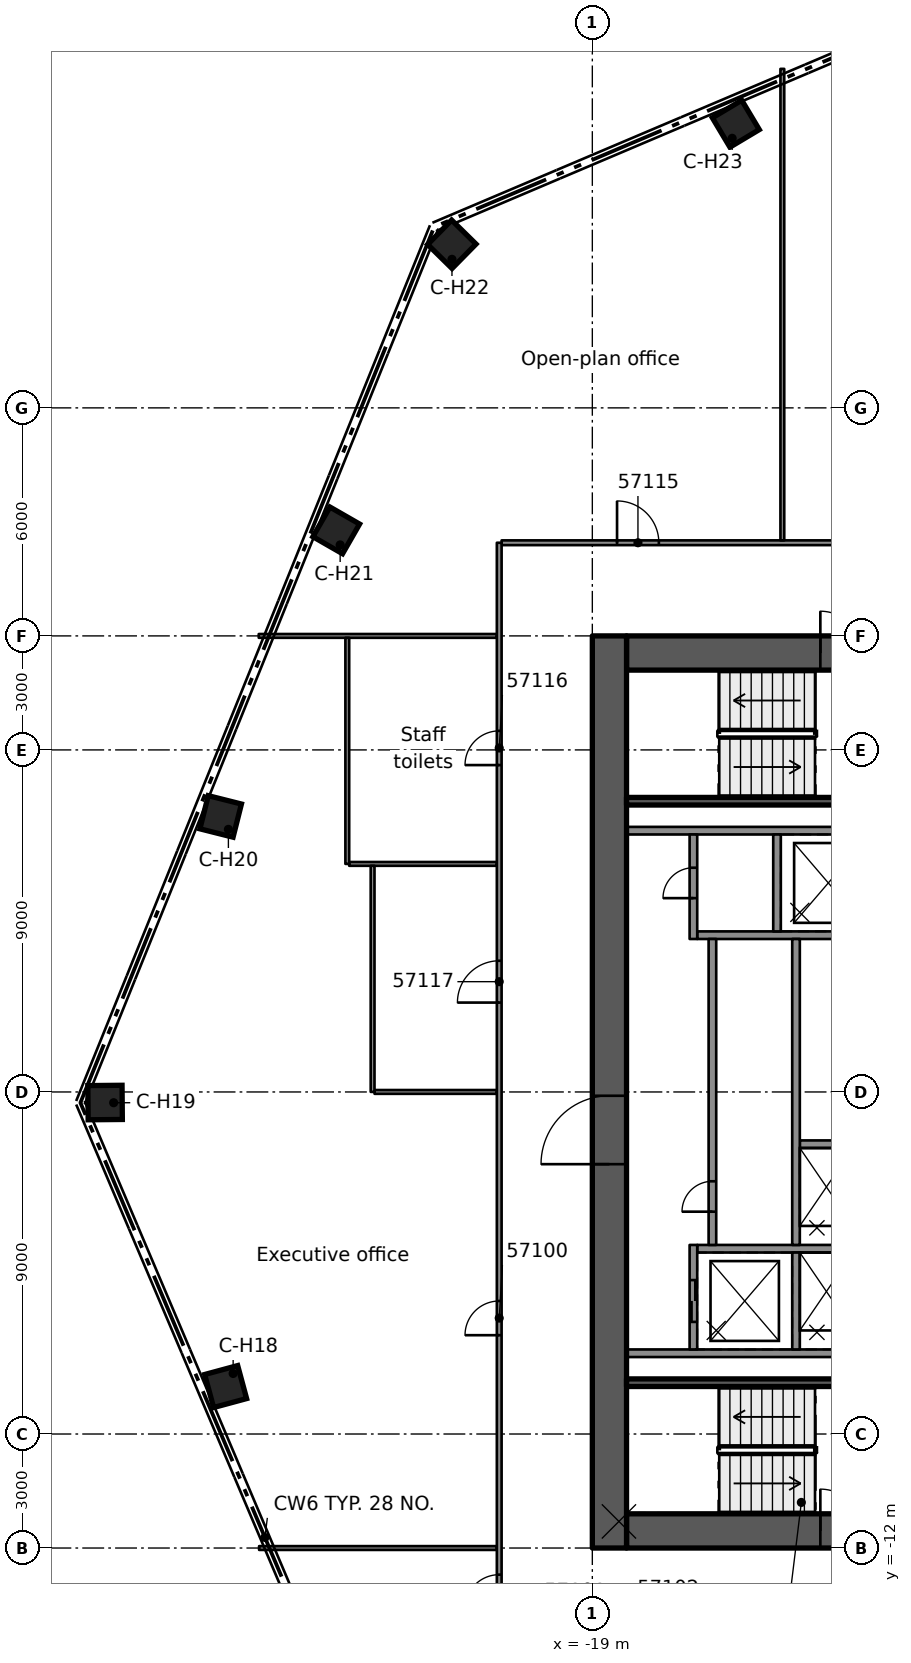
"""IFC4 building model, lengths in metres.
Left out: names, types, materials, properties, quantities, classifications, styles, units other than length and angle.
Written with IfcOpenShell. Run it as: python <this file> out.ifc"""

import sys

from ifc_helpers import new_model, si_unit, direction, frame, frame_2d, origin, origin_2d, place, context, subcontext, project, spatial, rectangle, extrude, element, fill, save


model = new_model("IFC4")
c1 = context("Model", 3, precision=1e-05, world=origin(), true_north=direction((0.0, 1.0)))
c2 = subcontext(c1, "Body", "Model", "MODEL_VIEW")
j1 = project(units=[si_unit("LENGTHUNIT", "METRE"), si_unit("PLANEANGLEUNIT", "RADIAN")], contexts=[c1])
p1 = place(None, origin())
s1 = spatial("IfcSite", under=j1, at=p1, CompositionType="ELEMENT")
p2 = place(p1, origin())
s2 = spatial("IfcBuilding", under=s1, at=p2, CompositionType="ELEMENT")
p3 = place(p2, frame((0.0, 0.0, 282.4)))
s3 = spatial("IfcBuildingStorey", under=s2, at=p3, CompositionType="ELEMENT", Elevation=282.4)
p4 = place(p3, frame((-18.1, 11.55, 0.0), z_axis=(0.0, 0.0, 1.0), x_axis=(1.0, 0.0, 0.0)))
e1 = element("IfcWall", 1, at=p4, inside=s3, PredefinedType="SHEAR", context=c2, shape_type="SweptSolid", body=[
    extrude(rectangle(XDim=9.2, YDim=0.9, at=frame_2d((4.6, 0.0))), origin(), (0.0, 0.0, 1.0), 3.5),
])
p5 = place(p4, frame((5.1, 0.0, 0.0)))
e2 = element("IfcOpeningElement", 2, at=p5, cuts=e1, PredefinedType="OPENING", context=c2, shape_type="SweptSolid", body=[
    extrude(rectangle(XDim=1.1, YDim=2.1, at=frame_2d((0.55, 1.05))), frame((0.0, 0.46, 0.0), z_axis=(0.0, -1.0, 0.0), x_axis=(1.0, 0.0, 0.0)), (0.0, 0.0, 1.0), 0.92),
])
p6 = place(p3, frame((-18.1, -11.55, 0.0), z_axis=(0.0, 0.0, 1.0), x_axis=(1.0, 0.0, 0.0)))
e3 = element("IfcWall", 3, at=p6, inside=s3, PredefinedType="SHEAR", context=c2, shape_type="SweptSolid", body=[
    extrude(rectangle(XDim=9.2, YDim=0.9, at=frame_2d((4.6, 0.0))), origin(), (0.0, 0.0, 1.0), 3.5),
])
p7 = place(p6, frame((5.1, 0.0, 0.0)))
e4 = element("IfcOpeningElement", 4, at=p7, cuts=e3, PredefinedType="OPENING", context=c2, shape_type="SweptSolid", body=[
    extrude(rectangle(XDim=1.1, YDim=2.1, at=frame_2d((0.55, 1.05))), frame((0.0, 0.46, 0.0), z_axis=(0.0, -1.0, 0.0), x_axis=(1.0, 0.0, 0.0)), (0.0, 0.0, 1.0), 0.92),
])
p8 = place(p6, frame((7.53, 0.0, 0.0)))
e5 = element("IfcOpeningElement", 5, at=p8, cuts=e3, PredefinedType="OPENING", context=c2, shape_type="SweptSolid", body=[
    extrude(rectangle(XDim=0.9, YDim=2.1, at=frame_2d((0.45, 1.05))), frame((0.0, 0.46, 0.0), z_axis=(0.0, -1.0, 0.0), x_axis=(1.0, 0.0, 0.0)), (0.0, 0.0, 1.0), 0.92),
])
p9 = place(p3, frame((-18.55, -12.0, 0.0), z_axis=(0.0, 0.0, 1.0), x_axis=(0.0, 1.0, 0.0)))
e6 = element("IfcWall", 6, at=p9, inside=s3, PredefinedType="SHEAR", context=c2, shape_type="SweptSolid", body=[
    extrude(rectangle(XDim=24.0, YDim=0.9, at=frame_2d((12.0, 0.0))), origin(), (0.0, 0.0, 1.0), 3.5),
])
p10 = place(p9, frame((10.1, 0.0, 0.0)))
e7 = element("IfcOpeningElement", 7, at=p10, cuts=e6, PredefinedType="OPENING", context=c2, shape_type="SweptSolid", body=[
    extrude(rectangle(XDim=1.8, YDim=2.1, at=frame_2d((0.9, 1.05))), frame((0.0, 0.46, 0.0), z_axis=(0.0, -1.0, 0.0), x_axis=(1.0, 0.0, 0.0)), (0.0, 0.0, 1.0), 0.92),
])
for number, where, z_axis, x_axis in (
    (8, (-28.649, -7.751, 0.0), (0.0, 0.0, 1.0), (-0.965, -0.261, 0.0)),
    (9, (-31.821, -0.278, 0.0), (0.0, 0.0, 1.0), (-1.0, -0.009, 0.0)),
    (10, (-28.78, 7.25, 0.0), (0.0, 0.0, 1.0), (-0.97, 0.244, 0.0)),
    (11, (-25.739, 14.777, 0.0), (0.0, 0.0, 1.0), (-0.867, 0.498, 0.0)),
    (12, (-22.697, 22.305, 0.0), (0.0, 0.0, 1.0), (-0.713, 0.701, 0.0)),
    (13, (-15.224, 25.477, 0.0), (0.0, 0.0, 1.0), (-0.513, 0.858, 0.0)),
):
    element("IfcColumn", number, at=place(p3, frame(where, z_axis=z_axis, x_axis=x_axis)), inside=s3, PredefinedType="COLUMN", context=c2, shape_type="SweptSolid", body=[
        extrude(rectangle(XDim=0.9, YDim=0.9, at=origin_2d()), origin(), (0.0, 0.0, 1.0), 3.5),
    ])
for number, where, z_axis, x_axis in (
    (14, (-11.54, 6.875, 0.0), (0.0, 0.0, 1.0), (-1.0, 0.0, 0.0)),
    (15, (-11.54, -6.875, 0.0), (0.0, 0.0, 1.0), (-1.0, 0.0, 0.0)),
):
    element("IfcWall", number, at=place(p3, frame(where, z_axis=z_axis, x_axis=x_axis)), inside=s3, PredefinedType="SOLIDWALL", context=c2, shape_type="SweptSolid", body=[
        extrude(rectangle(XDim=6.56, YDim=0.2, at=frame_2d((3.28, 0.0))), origin(), (0.0, 0.0, 1.0), 3.09),
    ])
p11 = place(p3, frame((-11.54, -4.125, 0.0), z_axis=(0.0, 0.0, 1.0), x_axis=(-1.0, 0.0, 0.0)))
e16 = element("IfcWall", 16, at=p11, inside=s3, PredefinedType="SOLIDWALL", context=c2, shape_type="SweptSolid", body=[
    extrude(rectangle(XDim=4.7, YDim=0.2, at=frame_2d((2.35, 0.0))), origin(), (0.0, 0.0, 1.0), 3.09),
])
p12 = place(p3, frame((-11.54, -1.375, 0.0), z_axis=(0.0, 0.0, 1.0), x_axis=(-1.0, 0.0, 0.0)))
e17 = element("IfcWall", 17, at=p12, inside=s3, PredefinedType="SOLIDWALL", context=c2, shape_type="SweptSolid", body=[
    extrude(rectangle(XDim=2.0, YDim=0.2, at=frame_2d((1.0, 0.0))), origin(), (0.0, 0.0, 1.0), 3.09),
])
p13 = place(p3, frame((-11.54, 4.125, 0.0), z_axis=(0.0, 0.0, 1.0), x_axis=(-1.0, 0.0, 0.0)))
e18 = element("IfcWall", 18, at=p13, inside=s3, PredefinedType="SOLIDWALL", context=c2, shape_type="SweptSolid", body=[
    extrude(rectangle(XDim=4.7, YDim=0.2, at=frame_2d((2.35, 0.0))), origin(), (0.0, 0.0, 1.0), 3.09),
])
p14 = place(p3, frame((-13.64, -6.775, 0.0), z_axis=(0.0, 0.0, 1.0), x_axis=(0.0, 1.0, 0.0)))
e19 = element("IfcWall", 19, at=p14, inside=s3, PredefinedType="SOLIDWALL", context=c2, shape_type="SweptSolid", body=[
    extrude(rectangle(XDim=2.55, YDim=0.2, at=frame_2d((1.275, 0.0))), origin(), (0.0, 0.0, 1.0), 3.09),
])
p15 = place(p3, frame((-13.64, -4.025, 0.0), z_axis=(0.0, 0.0, 1.0), x_axis=(0.0, 1.0, 0.0)))
e20 = element("IfcWall", 20, at=p15, inside=s3, PredefinedType="SOLIDWALL", context=c2, shape_type="SweptSolid", body=[
    extrude(rectangle(XDim=8.05, YDim=0.2, at=frame_2d((4.025, 0.0))), origin(), (0.0, 0.0, 1.0), 3.09),
])
p16 = place(p3, frame((-14.14, 4.225, 0.0), z_axis=(0.0, 0.0, 1.0), x_axis=(0.0, 1.0, 0.0)))
e21 = element("IfcWall", 21, at=p16, inside=s3, PredefinedType="SOLIDWALL", context=c2, shape_type="SweptSolid", body=[
    extrude(rectangle(XDim=2.55, YDim=0.2, at=frame_2d((1.275, 0.0))), origin(), (0.0, 0.0, 1.0), 3.09),
])
p17 = place(p3, frame((-16.34, -6.775, 0.0), z_axis=(0.0, 0.0, 1.0), x_axis=(0.0, 1.0, 0.0)))
e22 = element("IfcWall", 22, at=p17, inside=s3, PredefinedType="SOLIDWALL", context=c2, shape_type="SweptSolid", body=[
    extrude(rectangle(XDim=2.75, YDim=0.2, at=frame_2d((1.375, 0.0))), origin(), (0.0, 0.0, 1.0), 3.09),
])
p18 = place(p17, frame((0.725, 0.0, 0.0)))
e23 = element("IfcOpeningElement", 23, at=p18, cuts=e22, PredefinedType="OPENING", context=c2, shape_type="SweptSolid", body=[
    extrude(rectangle(XDim=1.1, YDim=2.1, at=frame_2d((0.55, 1.05))), frame((0.0, 0.11, 0.0), z_axis=(0.0, -1.0, 0.0), x_axis=(1.0, 0.0, 0.0)), (0.0, 0.0, 1.0), 0.22),
])
p19 = place(p3, frame((-15.84, -4.025, 0.0), z_axis=(0.0, 0.0, 1.0), x_axis=(0.0, 1.0, 0.0)))
e24 = element("IfcWall", 24, at=p19, inside=s3, PredefinedType="SOLIDWALL", context=c2, shape_type="SweptSolid", body=[
    extrude(rectangle(XDim=8.05, YDim=0.2, at=frame_2d((4.025, 0.0))), origin(), (0.0, 0.0, 1.0), 3.09),
])
p20 = place(p19, frame((0.875, 0.0, 0.0)))
e25 = element("IfcOpeningElement", 25, at=p20, cuts=e24, PredefinedType="OPENING", context=c2, shape_type="SweptSolid", body=[
    extrude(rectangle(XDim=0.8, YDim=2.1, at=frame_2d((0.4, 1.05))), frame((0.0, 0.11, 0.0), z_axis=(0.0, -1.0, 0.0), x_axis=(1.0, 0.0, 0.0)), (0.0, 0.0, 1.0), 0.22),
])
p21 = place(p3, frame((-16.34, 4.025, 0.0), z_axis=(0.0, 0.0, 1.0), x_axis=(0.0, 1.0, 0.0)))
e26 = element("IfcWall", 26, at=p21, inside=s3, PredefinedType="SOLIDWALL", context=c2, shape_type="SweptSolid", body=[
    extrude(rectangle(XDim=2.75, YDim=0.2, at=frame_2d((1.375, 0.0))), origin(), (0.0, 0.0, 1.0), 3.09),
])
p22 = place(p21, frame((1.075, 0.0, 0.0)))
e27 = element("IfcOpeningElement", 27, at=p22, cuts=e26, PredefinedType="OPENING", context=c2, shape_type="SweptSolid", body=[
    extrude(rectangle(XDim=0.8, YDim=2.1, at=frame_2d((0.4, 1.05))), frame((0.0, 0.11, 0.0), z_axis=(0.0, -1.0, 0.0), x_axis=(1.0, 0.0, 0.0)), (0.0, 0.0, 1.0), 0.22),
])
for number, where, z_axis, x_axis in (
    (28, (-11.54, 7.65, 0.0), (0.0, 0.0, 1.0), (-1.0, 0.0, 0.0)),
    (29, (-11.54, -7.65, 0.0), (0.0, 0.0, 1.0), (-1.0, 0.0, 0.0)),
):
    element("IfcWall", number, at=place(p3, frame(where, z_axis=z_axis, x_axis=x_axis)), inside=s3, PredefinedType="SOLIDWALL", context=c2, shape_type="SweptSolid", body=[
        extrude(rectangle(XDim=6.56, YDim=0.2, at=frame_2d((3.28, 0.0))), origin(), (0.0, 0.0, 1.0), 3.09),
    ])
p23 = place(p3, frame((-27.769, -12.0, 0.0), z_axis=(0.0, 0.0, 1.0), x_axis=(1.0, 0.0, 0.0)))
e30 = element("IfcWall", 30, at=p23, inside=s3, PredefinedType="PARTITIONING", context=c2, shape_type="SweptSolid", body=[
    extrude(rectangle(XDim=6.257, YDim=0.1, at=frame_2d((3.128, 0.0))), origin(), (0.0, 0.0, 1.0), 3.08),
])
p24 = place(p3, frame((-24.731, 0.001, 0.0), z_axis=(0.0, 0.0, 1.0), x_axis=(1.0, 0.0, 0.0)))
e31 = element("IfcWall", 31, at=p24, inside=s3, PredefinedType="PARTITIONING", context=c2, shape_type="SweptSolid", body=[
    extrude(rectangle(XDim=3.219, YDim=0.1, at=frame_2d((1.609, 0.0))), origin(), (0.0, 0.0, 1.0), 3.08),
])
p25 = place(p3, frame((-25.398, 6.001, 0.0), z_axis=(0.0, 0.0, 1.0), x_axis=(1.0, 0.0, 0.0)))
e32 = element("IfcWall", 32, at=p25, inside=s3, PredefinedType="PARTITIONING", context=c2, shape_type="SweptSolid", body=[
    extrude(rectangle(XDim=3.886, YDim=0.1, at=frame_2d((1.943, 0.0))), origin(), (0.0, 0.0, 1.0), 3.08),
])
p26 = place(p3, frame((-27.778, 12.0, 0.0), z_axis=(0.0, 0.0, 1.0), x_axis=(1.0, 0.0, 0.0)))
e33 = element("IfcWall", 33, at=p26, inside=s3, PredefinedType="PARTITIONING", context=c2, shape_type="SweptSolid", body=[
    extrude(rectangle(XDim=6.266, YDim=0.1, at=frame_2d((3.133, 0.0))), origin(), (0.0, 0.0, 1.0), 3.08),
])
p27 = place(p3, frame((-21.387, 14.451, 0.0), z_axis=(0.0, 0.0, 1.0), x_axis=(1.0, 0.0, 0.0)))
e34 = element("IfcWall", 34, at=p27, inside=s3, PredefinedType="PARTITIONING", context=c2, shape_type="SweptSolid", body=[
    extrude(rectangle(XDim=10.996, YDim=0.125, at=frame_2d((5.498, 0.0))), origin(), (0.0, 0.0, 1.0), 3.08),
])
p28 = place(p27, frame((3.038, 0.0, 0.0)))
e35 = element("IfcOpeningElement", 35, at=p28, cuts=e34, PredefinedType="OPENING", context=c2, shape_type="SweptSolid", body=[
    extrude(rectangle(XDim=1.1, YDim=2.1, at=frame_2d((0.55, 1.05))), frame((0.0, 0.073, 0.0), z_axis=(0.0, -1.0, 0.0), x_axis=(1.0, 0.0, 0.0)), (0.0, 0.0, 1.0), 0.145),
])
p29 = place(p3, frame((-14.0, 14.514, 0.0), z_axis=(0.0, 0.0, 1.0), x_axis=(0.0, 1.0, 0.0)))
e36 = element("IfcWall", 36, at=p29, inside=s3, PredefinedType="PARTITIONING", context=c2, shape_type="SweptSolid", body=[
    extrude(rectangle(XDim=12.406, YDim=0.1, at=frame_2d((6.203, 0.0))), origin(), (0.0, 0.0, 1.0), 3.08),
])
p30 = place(p3, frame((-21.45, -14.451, 0.0), z_axis=(0.0, 0.0, 1.0), x_axis=(0.0, 1.0, 0.0)))
e37 = element("IfcWall", 37, at=p30, inside=s3, PredefinedType="PARTITIONING", context=c2, shape_type="SweptSolid", body=[
    extrude(rectangle(XDim=28.902, YDim=0.125, at=frame_2d((14.451, 0.0))), origin(), (0.0, 0.0, 1.0), 3.08),
])
p31 = place(p30, frame((8.051, 0.0, 0.0)))
e38 = element("IfcOpeningElement", 38, at=p31, cuts=e37, PredefinedType="OPENING", context=c2, shape_type="SweptSolid", body=[
    extrude(rectangle(XDim=0.9, YDim=2.1, at=frame_2d((0.45, 1.05))), frame((0.0, 0.073, 0.0), z_axis=(0.0, -1.0, 0.0), x_axis=(1.0, 0.0, 0.0)), (0.0, 0.0, 1.0), 0.145),
])
p32 = place(p30, frame((0.85, 0.0, 0.0)))
e39 = element("IfcOpeningElement", 39, at=p32, cuts=e37, PredefinedType="OPENING", context=c2, shape_type="SweptSolid", body=[
    extrude(rectangle(XDim=0.9, YDim=2.1, at=frame_2d((0.45, 1.05))), frame((0.0, 0.073, 0.0), z_axis=(0.0, -1.0, 0.0), x_axis=(1.0, 0.0, 0.0)), (0.0, 0.0, 1.0), 0.145),
])
p33 = place(p30, frame((23.052, 0.0, 0.0)))
e40 = element("IfcOpeningElement", 40, at=p33, cuts=e37, PredefinedType="OPENING", context=c2, shape_type="SweptSolid", body=[
    extrude(rectangle(XDim=0.9, YDim=2.1, at=frame_2d((0.45, 1.05))), frame((0.0, 0.073, 0.0), z_axis=(0.0, -1.0, 0.0), x_axis=(1.0, 0.0, 0.0)), (0.0, 0.0, 1.0), 0.145),
])
p34 = place(p30, frame((16.803, 0.0, 0.0)))
e41 = element("IfcOpeningElement", 41, at=p34, cuts=e37, PredefinedType="OPENING", context=c2, shape_type="SweptSolid", body=[
    extrude(rectangle(XDim=1.1, YDim=2.1, at=frame_2d((0.55, 1.05))), frame((0.0, 0.073, 0.0), z_axis=(0.0, -1.0, 0.0), x_axis=(1.0, 0.0, 0.0)), (0.0, 0.0, 1.0), 0.145),
])
for number, where, z_axis, x_axis in (
    (42, (-24.782, 0.002, 0.0), (0.0, 0.0, 1.0), (0.0, 1.0, 0.0)),
    (43, (-25.448, 6.001, 0.0), (0.0, 0.0, 1.0), (0.0, 1.0, 0.0)),
):
    element("IfcWall", number, at=place(p3, frame(where, z_axis=z_axis, x_axis=x_axis)), inside=s3, PredefinedType="PARTITIONING", context=c2, shape_type="SweptSolid", body=[
        extrude(rectangle(XDim=5.949, YDim=0.1, at=frame_2d((2.975, 0.0))), origin(), (0.0, 0.0, 1.0), 3.08),
    ])
p35 = place(p18, origin())
e44 = element("IfcDoor", 44, at=p35, inside=s3, OperationType="DOUBLE_DOOR_SLIDING", PredefinedType="DOOR", context=c2, shape_type="SweptSolid", body=[
    extrude(rectangle(XDim=1.1, YDim=2.1, at=frame_2d((0.55, 1.05))), frame((0.0, 0.025, 0.0), z_axis=(0.0, -1.0, 0.0), x_axis=(1.0, 0.0, 0.0)), (0.0, 0.0, 1.0), 0.05),
])
fill(e23, e44)
p36 = place(p20, origin())
e45 = element("IfcDoor", 45, at=p36, inside=s3, OperationType="SINGLE_SWING_LEFT", PredefinedType="DOOR", context=c2, shape_type="SweptSolid", body=[
    extrude(rectangle(XDim=0.8, YDim=2.1, at=frame_2d((0.4, 1.05))), frame((0.0, 0.025, 0.0), z_axis=(0.0, -1.0, 0.0), x_axis=(1.0, 0.0, 0.0)), (0.0, 0.0, 1.0), 0.05),
])
fill(e25, e45)
p37 = place(p22, origin())
e46 = element("IfcDoor", 46, at=p37, inside=s3, OperationType="SINGLE_SWING_LEFT", PredefinedType="DOOR", context=c2, shape_type="SweptSolid", body=[
    extrude(rectangle(XDim=0.8, YDim=2.1, at=frame_2d((0.4, 1.05))), frame((0.0, 0.025, 0.0), z_axis=(0.0, -1.0, 0.0), x_axis=(1.0, 0.0, 0.0)), (0.0, 0.0, 1.0), 0.05),
])
fill(e27, e46)
p38 = place(p10, origin())
e47 = element("IfcDoor", 47, at=p38, inside=s3, OperationType="SINGLE_SWING_LEFT", PredefinedType="DOOR", context=c2, shape_type="SweptSolid", body=[
    extrude(rectangle(XDim=1.8, YDim=2.1, at=frame_2d((0.9, 1.05))), frame((0.0, 0.025, 0.0), z_axis=(0.0, -1.0, 0.0), x_axis=(1.0, 0.0, 0.0)), (0.0, 0.0, 1.0), 0.05),
])
fill(e7, e47)
p39 = place(p5, origin())
e48 = element("IfcDoor", 48, at=p39, inside=s3, OperationType="SINGLE_SWING_RIGHT", PredefinedType="DOOR", context=c2, shape_type="SweptSolid", body=[
    extrude(rectangle(XDim=1.1, YDim=2.1, at=frame_2d((0.55, 1.05))), frame((0.0, 0.025, 0.0), z_axis=(0.0, -1.0, 0.0), x_axis=(1.0, 0.0, 0.0)), (0.0, 0.0, 1.0), 0.05),
])
fill(e2, e48)
p40 = place(p7, origin())
e49 = element("IfcDoor", 49, at=p40, inside=s3, OperationType="SINGLE_SWING_RIGHT", PredefinedType="DOOR", context=c2, shape_type="SweptSolid", body=[
    extrude(rectangle(XDim=1.1, YDim=2.1, at=frame_2d((0.55, 1.05))), frame((0.0, 0.025, 0.0), z_axis=(0.0, -1.0, 0.0), x_axis=(1.0, 0.0, 0.0)), (0.0, 0.0, 1.0), 0.05),
])
fill(e4, e49)
p41 = place(p31, origin())
e50 = element("IfcDoor", 50, at=p41, inside=s3, OperationType="SINGLE_SWING_LEFT", PredefinedType="DOOR", context=c2, shape_type="SweptSolid", body=[
    extrude(rectangle(XDim=0.9, YDim=2.1, at=frame_2d((0.45, 1.05))), frame((0.0, 0.025, 0.0), z_axis=(0.0, -1.0, 0.0), x_axis=(1.0, 0.0, 0.0)), (0.0, 0.0, 1.0), 0.05),
])
fill(e38, e50)
p42 = place(p32, origin())
e51 = element("IfcDoor", 51, at=p42, inside=s3, OperationType="SINGLE_SWING_LEFT", PredefinedType="DOOR", context=c2, shape_type="SweptSolid", body=[
    extrude(rectangle(XDim=0.9, YDim=2.1, at=frame_2d((0.45, 1.05))), frame((0.0, 0.025, 0.0), z_axis=(0.0, -1.0, 0.0), x_axis=(1.0, 0.0, 0.0)), (0.0, 0.0, 1.0), 0.05),
])
fill(e39, e51)
p43 = place(p28, origin())
e52 = element("IfcDoor", 52, at=p43, inside=s3, OperationType="SINGLE_SWING_LEFT", PredefinedType="DOOR", context=c2, shape_type="SweptSolid", body=[
    extrude(rectangle(XDim=1.1, YDim=2.1, at=frame_2d((0.55, 1.05))), frame((0.0, 0.025, 0.0), z_axis=(0.0, -1.0, 0.0), x_axis=(1.0, 0.0, 0.0)), (0.0, 0.0, 1.0), 0.05),
])
fill(e35, e52)
p44 = place(p33, origin())
e53 = element("IfcDoor", 53, at=p44, inside=s3, OperationType="SINGLE_SWING_RIGHT", PredefinedType="DOOR", context=c2, shape_type="SweptSolid", body=[
    extrude(rectangle(XDim=0.9, YDim=2.1, at=frame_2d((0.45, 1.05))), frame((0.0, 0.025, 0.0), z_axis=(0.0, -1.0, 0.0), x_axis=(1.0, 0.0, 0.0)), (0.0, 0.0, 1.0), 0.05),
])
fill(e40, e53)
p45 = place(p34, origin())
e54 = element("IfcDoor", 54, at=p45, inside=s3, OperationType="SINGLE_SWING_RIGHT", PredefinedType="DOOR", context=c2, shape_type="SweptSolid", body=[
    extrude(rectangle(XDim=1.1, YDim=2.1, at=frame_2d((0.55, 1.05))), frame((0.0, 0.025, 0.0), z_axis=(0.0, -1.0, 0.0), x_axis=(1.0, 0.0, 0.0)), (0.0, 0.0, 1.0), 0.05),
])
fill(e41, e54)
save(model, sys.argv[1])
